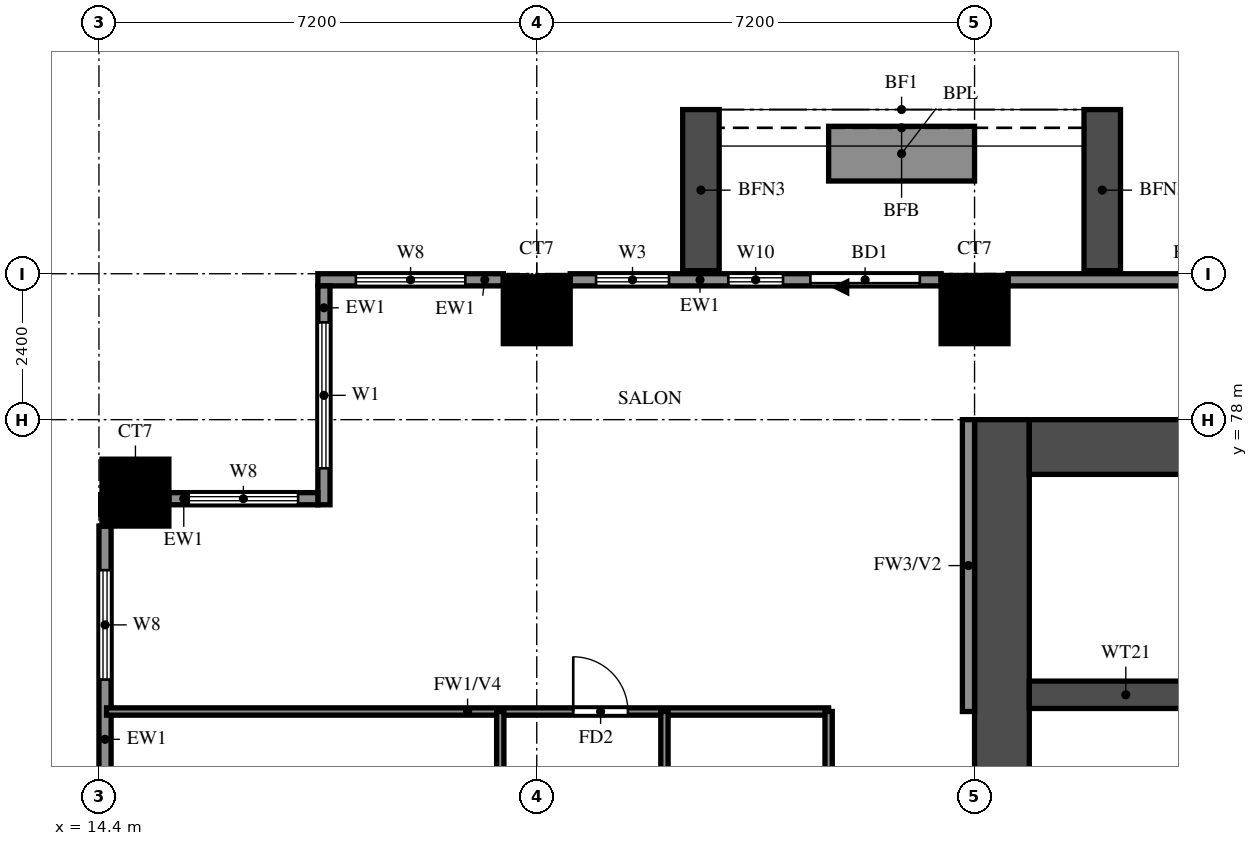
"""IFC4 building model, lengths in metres.
Left out: names, types, materials, properties, quantities, classifications, styles, units other than length and angle.
Written with IfcOpenShell. Run it as: python <this file> out.ifc"""

import sys

from ifc_helpers import new_model, si_unit, direction, frame, frame_2d, origin, origin_2d, place, context, subcontext, project, spatial, rectangle, extrude, source, transform, mapped, element, fill, save


model = new_model("IFC4")
c1 = context("Model", 3, precision=1e-05, world=origin(), true_north=direction((0.0, 1.0)))
c2 = subcontext(c1, "Body", "Model", "MODEL_VIEW")
j1 = project(units=[si_unit("LENGTHUNIT", "METRE"), si_unit("PLANEANGLEUNIT", "RADIAN")], contexts=[c1])
p1 = place(None, origin())
s1 = spatial("IfcSite", under=j1, at=p1, CompositionType="ELEMENT")
p2 = place(p1, origin())
s2 = spatial("IfcBuilding", under=s1, at=p2, CompositionType="ELEMENT")
p3 = place(p2, frame((0.0, 0.0, 51.5)))
s3 = spatial("IfcBuildingStorey", under=s2, at=p3, CompositionType="ELEMENT", Elevation=51.5)
m1 = source(origin(), c2, "Body", "SweptSolid", [
    extrude(rectangle(XDim=1.1, YDim=1.1, at=origin_2d()), origin(), (0.0, 0.0, 1.0), 3.18),
])
for number, where, z_axis, x_axis in (
    (1, (15.0, 76.8, 0.0), (0.0, 0.0, 1.0), (1.0, 0.0, 0.0)),
    (2, (21.6, 79.8, 0.0), (0.0, 0.0, 1.0), (1.0, 0.0, 0.0)),
    (3, (28.8, 79.8, 0.0), (0.0, 0.0, 1.0), (1.0, 0.0, 0.0)),
):
    element("IfcColumn", number, at=place(p3, frame(where, z_axis=z_axis, x_axis=x_axis)), inside=s3, PredefinedType="COLUMN", context=c2, shape_type="MappedRepresentation", body=[
        mapped(m1, transform((0.0, 0.0, 0.0))),
    ])
p4 = place(p3, frame((29.25, 66.0, 0.0), z_axis=(0.0, 0.0, 1.0), x_axis=(0.0, 1.0, 0.0)))
e4 = element("IfcWall", 4, at=p4, inside=s3, PredefinedType="SHEAR", context=c2, shape_type="SweptSolid", body=[
    extrude(rectangle(XDim=12.0, YDim=0.9, at=frame_2d((6.0, 0.0))), origin(), (0.0, 0.0, 1.0), 3.18),
])
p5 = place(p3, frame((29.7, 77.55, 0.0), z_axis=(0.0, 0.0, 1.0), x_axis=(1.0, 0.0, 0.0)))
e5 = element("IfcWall", 5, at=p5, inside=s3, PredefinedType="SHEAR", context=c2, shape_type="SweptSolid", body=[
    extrude(rectangle(XDim=41.4, YDim=0.9, at=frame_2d((20.7, 0.0))), origin(), (0.0, 0.0, 1.0), 3.18),
])
p6 = place(p3, frame((29.7, 73.475, 0.0), z_axis=(0.0, 0.0, 1.0), x_axis=(1.0, 0.0, 0.0)))
e6 = element("IfcWall", 6, at=p6, inside=s3, PredefinedType="SHEAR", context=c2, shape_type="SweptSolid", body=[
    extrude(rectangle(XDim=3.175, YDim=0.45, at=frame_2d((1.587, 0.0))), origin(), (0.0, 0.0, 1.0), 3.18),
])
p7 = place(p3, frame((35.45, 80.3, 0.0), z_axis=(0.0, 0.0, 1.0), x_axis=(-1.0, 0.0, 0.0)))
e7 = element("IfcWall", 7, at=p7, inside=s3, PredefinedType="SOLIDWALL", context=c2, shape_type="SweptSolid", body=[
    extrude(rectangle(XDim=6.1, YDim=0.2, at=frame_2d((3.05, 0.0))), origin(), (0.0, 0.0, 1.0), 3.18),
])
p8 = place(p3, frame((28.25, 80.3, 0.0), z_axis=(0.0, 0.0, 1.0), x_axis=(-1.0, 0.0, 0.0)))
e8 = element("IfcWall", 8, at=p8, inside=s3, PredefinedType="SOLIDWALL", context=c2, shape_type="SweptSolid", body=[
    extrude(rectangle(XDim=6.1, YDim=0.2, at=frame_2d((3.05, 0.0))), origin(), (0.0, 0.0, 1.0), 3.18),
])
p9 = place(p8, frame((0.35, 0.0, 0.0)))
e9 = element("IfcOpeningElement", 9, at=p9, cuts=e8, PredefinedType="OPENING", context=c2, shape_type="SweptSolid", body=[
    extrude(rectangle(XDim=1.8, YDim=2.4, at=frame_2d((0.9, 1.2))), frame((0.0, 0.11, 0.0), z_axis=(0.0, -1.0, 0.0), x_axis=(1.0, 0.0, 0.0)), (0.0, 0.0, 1.0), 0.22),
])
p10 = place(p8, frame((2.6, 0.0, 0.6)))
e10 = element("IfcOpeningElement", 10, at=p10, cuts=e8, PredefinedType="OPENING", context=c2, shape_type="SweptSolid", body=[
    extrude(rectangle(XDim=0.9, YDim=2.4, at=frame_2d((0.45, 1.2))), frame((0.0, 0.11, 0.0), z_axis=(0.0, -1.0, 0.0), x_axis=(1.0, 0.0, 0.0)), (0.0, 0.0, 1.0), 0.22),
])
p11 = place(p8, frame((4.475, 0.0, 0.6)))
e11 = element("IfcOpeningElement", 11, at=p11, cuts=e8, PredefinedType="OPENING", context=c2, shape_type="SweptSolid", body=[
    extrude(rectangle(XDim=1.2, YDim=2.4, at=frame_2d((0.6, 1.2))), frame((0.0, 0.11, 0.0), z_axis=(0.0, -1.0, 0.0), x_axis=(1.0, 0.0, 0.0)), (0.0, 0.0, 1.0), 0.22),
])
p12 = place(p3, frame((21.05, 80.3, 0.0), z_axis=(0.0, 0.0, 1.0), x_axis=(-1.0, 0.0, 0.0)))
e12 = element("IfcWall", 12, at=p12, inside=s3, PredefinedType="SOLIDWALL", context=c2, shape_type="SweptSolid", body=[
    extrude(rectangle(XDim=3.05, YDim=0.2, at=frame_2d((1.525, 0.0))), origin(), (0.0, 0.0, 1.0), 3.18),
])
p13 = place(p12, frame((0.625, 0.0, 0.6)))
e13 = element("IfcOpeningElement", 13, at=p13, cuts=e12, PredefinedType="OPENING", context=c2, shape_type="SweptSolid", body=[
    extrude(rectangle(XDim=1.8, YDim=2.4, at=frame_2d((0.9, 1.2))), frame((0.0, 0.11, 0.0), z_axis=(0.0, -1.0, 0.0), x_axis=(1.0, 0.0, 0.0)), (0.0, 0.0, 1.0), 0.22),
])
p14 = place(p3, frame((18.1, 80.2, 0.0), z_axis=(0.0, 0.0, 1.0), x_axis=(0.0, -1.0, 0.0)))
e14 = element("IfcWall", 14, at=p14, inside=s3, PredefinedType="SOLIDWALL", context=c2, shape_type="SweptSolid", body=[
    extrude(rectangle(XDim=3.6, YDim=0.2, at=frame_2d((1.8, 0.0))), origin(), (0.0, 0.0, 1.0), 3.18),
])
p15 = place(p14, frame((0.6, 0.0, 0.6)))
e15 = element("IfcOpeningElement", 15, at=p15, cuts=e14, PredefinedType="OPENING", context=c2, shape_type="SweptSolid", body=[
    extrude(rectangle(XDim=2.4, YDim=2.4, at=frame_2d((1.2, 1.2))), frame((0.0, 0.11, 0.0), z_axis=(0.0, -1.0, 0.0), x_axis=(1.0, 0.0, 0.0)), (0.0, 0.0, 1.0), 0.22),
])
p16 = place(p3, frame((18.0, 76.7, 0.0), z_axis=(0.0, 0.0, 1.0), x_axis=(-1.0, 0.0, 0.0)))
e16 = element("IfcWall", 16, at=p16, inside=s3, PredefinedType="SOLIDWALL", context=c2, shape_type="SweptSolid", body=[
    extrude(rectangle(XDim=2.45, YDim=0.2, at=frame_2d((1.225, 0.0))), origin(), (0.0, 0.0, 1.0), 3.18),
])
p17 = place(p16, frame((0.325, 0.0, 0.6)))
e17 = element("IfcOpeningElement", 17, at=p17, cuts=e16, PredefinedType="OPENING", context=c2, shape_type="SweptSolid", body=[
    extrude(rectangle(XDim=1.8, YDim=2.4, at=frame_2d((0.9, 1.2))), frame((0.0, 0.11, 0.0), z_axis=(0.0, -1.0, 0.0), x_axis=(1.0, 0.0, 0.0)), (0.0, 0.0, 1.0), 0.22),
])
p18 = place(p3, frame((14.5, 76.25, 0.0), z_axis=(0.0, 0.0, 1.0), x_axis=(0.0, -1.0, 0.0)))
e18 = element("IfcWall", 18, at=p18, inside=s3, PredefinedType="SOLIDWALL", context=c2, shape_type="SweptSolid", body=[
    extrude(rectangle(XDim=6.1, YDim=0.2, at=frame_2d((3.05, 0.0))), origin(), (0.0, 0.0, 1.0), 3.18),
])
p19 = place(p18, frame((4.025, 0.0, 1.5)))
e19 = element("IfcOpeningElement", 19, at=p19, cuts=e18, PredefinedType="OPENING", context=c2, shape_type="SweptSolid", body=[
    extrude(rectangle(XDim=0.9, YDim=0.9, at=frame_2d((0.45, 0.45))), frame((0.0, 0.11, 0.0), z_axis=(0.0, -1.0, 0.0), x_axis=(1.0, 0.0, 0.0)), (0.0, 0.0, 1.0), 0.22),
])
p20 = place(p18, frame((0.725, 0.0, 0.6)))
e20 = element("IfcOpeningElement", 20, at=p20, cuts=e18, PredefinedType="OPENING", context=c2, shape_type="SweptSolid", body=[
    extrude(rectangle(XDim=1.8, YDim=2.4, at=frame_2d((0.9, 1.2))), frame((0.0, 0.11, 0.0), z_axis=(0.0, -1.0, 0.0), x_axis=(1.0, 0.0, 0.0)), (0.0, 0.0, 1.0), 0.22),
])
for number, where, z_axis, x_axis in (
    (21, (30.9, 80.45, 0.0), (0.0, 0.0, 1.0), (0.0, 1.0, 0.0)),
    (22, (24.3, 80.45, 0.0), (0.0, 0.0, 1.0), (0.0, 1.0, 0.0)),
):
    element("IfcWall", number, at=place(p3, frame(where, z_axis=z_axis, x_axis=x_axis)), inside=s3, PredefinedType="SOLIDWALL", context=c2, shape_type="SweptSolid", body=[
        extrude(rectangle(XDim=2.65, YDim=0.6, at=frame_2d((1.325, 0.0))), origin(), (0.0, 0.0, 1.0), 2.85),
    ])
p21 = place(p3, frame((28.8, 82.375, 0.0), z_axis=(0.0, 0.0, 1.0), x_axis=(-1.0, 0.0, 0.0)))
e23 = element("IfcWall", 23, at=p21, inside=s3, PredefinedType="SOLIDWALL", context=c2, shape_type="SweptSolid", body=[
    extrude(rectangle(XDim=2.4, YDim=0.9, at=frame_2d((1.2, 0.0))), origin(), (0.0, 0.0, 1.0), 0.9),
])
p22 = place(p3, frame((28.7, 73.2, 0.0), z_axis=(0.0, 0.0, 1.0), x_axis=(0.0, 1.0, 0.0)))
e24 = element("IfcWall", 24, at=p22, inside=s3, PredefinedType="SOLIDWALL", context=c2, shape_type="SweptSolid", body=[
    extrude(rectangle(XDim=4.8, YDim=0.2, at=frame_2d((2.4, 0.0))), origin(), (0.0, 0.0, 1.0), 3.18),
])
p23 = place(p3, frame((14.525, 73.2, 0.0), z_axis=(0.0, 0.0, 1.0), x_axis=(1.0, 0.0, 0.0)))
e25 = element("IfcWall", 25, at=p23, inside=s3, PredefinedType="PARTITIONING", context=c2, shape_type="SweptSolid", body=[
    extrude(rectangle(XDim=11.875, YDim=0.12, at=frame_2d((5.938, 0.0))), origin(), (0.0, 0.0, 1.0), 2.28),
])
p24 = place(p23, frame((7.675, 0.0, 0.0)))
e26 = element("IfcOpeningElement", 26, at=p24, cuts=e25, PredefinedType="OPENING", context=c2, shape_type="SweptSolid", body=[
    extrude(rectangle(XDim=0.9, YDim=2.1, at=frame_2d((0.45, 1.05))), frame((0.0, 0.07, 0.0), z_axis=(0.0, -1.0, 0.0), x_axis=(1.0, 0.0, 0.0)), (0.0, 0.0, 1.0), 0.14),
])
p25 = place(p3, frame((21.0, 69.6, 0.0), z_axis=(0.0, 0.0, 1.0), x_axis=(0.0, 1.0, 0.0)))
e27 = element("IfcWall", 27, at=p25, inside=s3, PredefinedType="PARTITIONING", context=c2, shape_type="SweptSolid", body=[
    extrude(rectangle(XDim=3.6, YDim=0.12, at=frame_2d((1.8, 0.0))), origin(), (0.0, 0.0, 1.0), 3.18),
])
p26 = place(p3, frame((23.7, 61.2, 0.0), z_axis=(0.0, 0.0, 1.0), x_axis=(0.0, 1.0, 0.0)))
e28 = element("IfcWall", 28, at=p26, inside=s3, PredefinedType="PARTITIONING", context=c2, shape_type="SweptSolid", body=[
    extrude(rectangle(XDim=12.0, YDim=0.12, at=frame_2d((6.0, 0.0))), origin(), (0.0, 0.0, 1.0), 3.18),
])
p27 = place(p26, frame((4.55, 0.0, 0.0)))
e29 = element("IfcOpeningElement", 29, at=p27, cuts=e28, PredefinedType="OPENING", context=c2, shape_type="SweptSolid", body=[
    extrude(rectangle(XDim=0.9, YDim=2.1, at=frame_2d((0.45, 1.05))), frame((0.0, 0.07, 0.0), z_axis=(0.0, -1.0, 0.0), x_axis=(1.0, 0.0, 0.0)), (0.0, 0.0, 1.0), 0.14),
])
p28 = place(p26, frame((9.3, 0.0, 0.0)))
e30 = element("IfcOpeningElement", 30, at=p28, cuts=e28, PredefinedType="OPENING", context=c2, shape_type="SweptSolid", body=[
    extrude(rectangle(XDim=0.8, YDim=2.1, at=frame_2d((0.4, 1.05))), frame((0.0, 0.07, 0.0), z_axis=(0.0, -1.0, 0.0), x_axis=(1.0, 0.0, 0.0)), (0.0, 0.0, 1.0), 0.14),
])
p29 = place(p3, frame((26.4, 68.6, 0.0), z_axis=(0.0, 0.0, 1.0), x_axis=(0.0, 1.0, 0.0)))
e31 = element("IfcWall", 31, at=p29, inside=s3, PredefinedType="PARTITIONING", context=c2, shape_type="SweptSolid", body=[
    extrude(rectangle(XDim=4.6, YDim=0.12, at=frame_2d((2.3, 0.0))), origin(), (0.0, 0.0, 1.0), 3.18),
])
p30 = place(p9, origin())
e32 = element("IfcDoor", 32, at=p30, inside=s3, OperationType="DOUBLE_DOOR_SLIDING", PredefinedType="DOOR", context=c2, shape_type="SweptSolid", body=[
    extrude(rectangle(XDim=1.8, YDim=2.4, at=frame_2d((0.9, 1.2))), frame((0.0, 0.025, 0.0), z_axis=(0.0, -1.0, 0.0), x_axis=(1.0, 0.0, 0.0)), (0.0, 0.0, 1.0), 0.05),
])
fill(e9, e32)
p31 = place(p10, origin())
e33 = element("IfcWindow", 33, at=p31, inside=s3, PartitioningType="SINGLE_PANEL", PredefinedType="WINDOW", context=c2, shape_type="SweptSolid", body=[
    extrude(rectangle(XDim=0.9, YDim=2.4, at=frame_2d((0.45, 1.2))), frame((0.0, 0.03, 0.0), z_axis=(0.0, -1.0, 0.0), x_axis=(1.0, 0.0, 0.0)), (0.0, 0.0, 1.0), 0.06),
])
fill(e10, e33)
p32 = place(p11, origin())
e34 = element("IfcWindow", 34, at=p32, inside=s3, PartitioningType="SINGLE_PANEL", PredefinedType="WINDOW", context=c2, shape_type="SweptSolid", body=[
    extrude(rectangle(XDim=1.2, YDim=2.4, at=frame_2d((0.6, 1.2))), frame((0.0, 0.03, 0.0), z_axis=(0.0, -1.0, 0.0), x_axis=(1.0, 0.0, 0.0)), (0.0, 0.0, 1.0), 0.06),
])
fill(e11, e34)
p33 = place(p13, origin())
e35 = element("IfcWindow", 35, at=p33, inside=s3, PartitioningType="DOUBLE_PANEL_VERTICAL", PredefinedType="WINDOW", context=c2, shape_type="SweptSolid", body=[
    extrude(rectangle(XDim=1.8, YDim=2.4, at=frame_2d((0.9, 1.2))), frame((0.0, 0.03, 0.0), z_axis=(0.0, -1.0, 0.0), x_axis=(1.0, 0.0, 0.0)), (0.0, 0.0, 1.0), 0.06),
])
fill(e13, e35)
p34 = place(p15, origin())
e36 = element("IfcWindow", 36, at=p34, inside=s3, PartitioningType="DOUBLE_PANEL_VERTICAL", PredefinedType="WINDOW", context=c2, shape_type="SweptSolid", body=[
    extrude(rectangle(XDim=2.4, YDim=2.4, at=frame_2d((1.2, 1.2))), frame((0.0, 0.03, 0.0), z_axis=(0.0, -1.0, 0.0), x_axis=(1.0, 0.0, 0.0)), (0.0, 0.0, 1.0), 0.06),
])
fill(e15, e36)
p35 = place(p17, origin())
e37 = element("IfcWindow", 37, at=p35, inside=s3, PartitioningType="DOUBLE_PANEL_VERTICAL", PredefinedType="WINDOW", context=c2, shape_type="SweptSolid", body=[
    extrude(rectangle(XDim=1.8, YDim=2.4, at=frame_2d((0.9, 1.2))), frame((0.0, 0.03, 0.0), z_axis=(0.0, -1.0, 0.0), x_axis=(1.0, 0.0, 0.0)), (0.0, 0.0, 1.0), 0.06),
])
fill(e17, e37)
p36 = place(p20, origin())
e38 = element("IfcWindow", 38, at=p36, inside=s3, PartitioningType="DOUBLE_PANEL_VERTICAL", PredefinedType="WINDOW", context=c2, shape_type="SweptSolid", body=[
    extrude(rectangle(XDim=1.8, YDim=2.4, at=frame_2d((0.9, 1.2))), frame((0.0, 0.03, 0.0), z_axis=(0.0, -1.0, 0.0), x_axis=(1.0, 0.0, 0.0)), (0.0, 0.0, 1.0), 0.06),
])
fill(e20, e38)
p37 = place(p24, origin())
e39 = element("IfcDoor", 39, at=p37, inside=s3, OperationType="SINGLE_SWING_LEFT", PredefinedType="DOOR", context=c2, shape_type="SweptSolid", body=[
    extrude(rectangle(XDim=0.9, YDim=2.1, at=frame_2d((0.45, 1.05))), frame((0.0, 0.025, 0.0), z_axis=(0.0, -1.0, 0.0), x_axis=(1.0, 0.0, 0.0)), (0.0, 0.0, 1.0), 0.05),
])
fill(e26, e39)
save(model, sys.argv[1])
